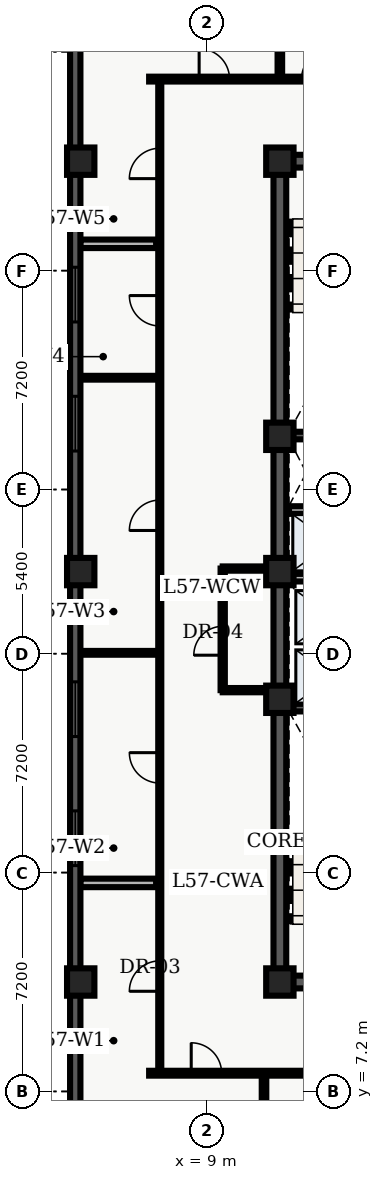
"""IFC4 building model, lengths in metres.
Left out: names, types, materials, properties, quantities, classifications, styles, units other than length and angle.
Written with IfcOpenShell. Run it as: python <this file> out.ifc"""

import sys

from ifc_helpers import new_model, entity, si_unit, converted_unit, direction, frame, origin_with_axes, origin_2d_with_axis, place, context, subcontext, project, spatial, polyline, rectangle, outline, extrude, element, fill, save


model = new_model("IFC4")
c1 = context("Model", 3, precision=1e-05, world=origin_with_axes(), true_north=direction((0.0, 1.0)))
c2 = subcontext(c1, "Body", "Model", "MODEL_VIEW")
j1 = project(units=[si_unit("LENGTHUNIT", "METRE"), converted_unit("PLANEANGLEUNIT", "DEGREE", entity("IfcPlaneAngleMeasure", 0.017), si_unit("PLANEANGLEUNIT", "RADIAN"), dimensions=[0, 0, 0, 0, 0, 0, 0])], contexts=[c1])
p1 = place(None, origin_with_axes())
s1 = spatial("IfcSite", under=j1, at=p1, CompositionType="ELEMENT")
p2 = place(p1, origin_with_axes())
s2 = spatial("IfcBuilding", under=s1, at=p2, CompositionType="ELEMENT")
p3 = place(p2, frame((0.0, 0.0, 232.5), z_axis=(0.0, 0.0, 1.0), x_axis=(1.0, 0.0, 0.0)))
s3 = spatial("IfcBuildingStorey", under=s2, at=p3, CompositionType="ELEMENT", Elevation=232.5)
p4 = place(p3, frame((11.4, 10.8, 0.0), z_axis=(0.0, 0.0, 1.0), x_axis=(0.0, 1.0, 0.0)))
e1 = element("IfcWall", 1, at=p4, inside=s3, PredefinedType="SHEAR", context=c2, shape_type="SweptSolid", body=[
    extrude(outline(polyline([(0.0, -0.21), (27.0, -0.21), (27.0, 0.21), (0.0, 0.21), (0.0, -0.21)])), origin_with_axes(), (0.0, 0.0, 1.0), 3.66),
])
p5 = place(p3, frame((11.4, 10.8, 0.0), z_axis=(0.0, 0.0, 1.0), x_axis=(1.0, 0.0, 0.0)))
e2 = element("IfcWall", 2, at=p5, inside=s3, PredefinedType="SHEAR", context=c2, shape_type="SweptSolid", body=[
    extrude(outline(polyline([(0.0, -0.21), (7.2, -0.21), (7.2, 0.21), (0.0, 0.21), (0.0, -0.21)])), origin_with_axes(), (0.0, 0.0, 1.0), 3.66),
])
p6 = place(p5, frame((2.625, 0.0, 0.0), z_axis=(0.0, 0.0, 1.0), x_axis=(1.0, 0.0, 0.0)))
e3 = element("IfcOpeningElement", 3, at=p6, cuts=e2, PredefinedType="OPENING", context=c2, shape_type="SweptSolid", body=[
    extrude(rectangle(XDim=1.05, YDim=0.44, at=origin_2d_with_axis()), origin_with_axes(), (0.0, 0.0, 1.0), 2.15),
])
p7 = place(p3, frame((11.4, 37.8, 0.0), z_axis=(0.0, 0.0, 1.0), x_axis=(1.0, 0.0, 0.0)))
e4 = element("IfcWall", 4, at=p7, inside=s3, PredefinedType="SHEAR", context=c2, shape_type="SweptSolid", body=[
    extrude(outline(polyline([(0.0, -0.21), (7.2, -0.21), (7.2, 0.21), (0.0, 0.21), (0.0, -0.21)])), origin_with_axes(), (0.0, 0.0, 1.0), 3.66),
])
p8 = place(p7, frame((2.625, 0.0, 0.0), z_axis=(0.0, 0.0, 1.0), x_axis=(1.0, 0.0, 0.0)))
e5 = element("IfcOpeningElement", 5, at=p8, cuts=e4, PredefinedType="OPENING", context=c2, shape_type="SweptSolid", body=[
    extrude(rectangle(XDim=1.05, YDim=0.44, at=origin_2d_with_axis()), origin_with_axes(), (0.0, 0.0, 1.0), 2.15),
])
for number, where, z_axis, x_axis in (
    (6, (11.61, 19.825, 0.0), (0.0, 0.0, 1.0), (1.0, 0.0, 0.0)),
    (7, (11.61, 28.775, 0.0), (0.0, 0.0, 1.0), (1.0, 0.0, 0.0)),
):
    element("IfcWall", number, at=place(p3, frame(where, z_axis=z_axis, x_axis=x_axis)), inside=s3, PredefinedType="SHEAR", context=c2, shape_type="SweptSolid", body=[
        extrude(outline(polyline([(0.0, -0.125), (6.78, -0.125), (6.78, 0.125), (0.0, 0.125), (0.0, -0.125)])), origin_with_axes(), (0.0, 0.0, 1.0), 3.66),
    ])
p9 = place(p3, frame((11.7, 24.1, 0.0), z_axis=(0.0, 0.0, 1.0), x_axis=(1.0, 0.0, 0.0)))
e8 = element("IfcWall", 8, at=p9, inside=s3, PredefinedType="SOLIDWALL", context=c2, shape_type="SweptSolid", body=[
    extrude(outline(polyline([(0.0, -0.125), (6.6, -0.125), (6.6, 0.125), (0.0, 0.125), (0.0, -0.125)])), origin_with_axes(), (0.0, 0.0, 1.0), 2.7),
])
p10 = place(p9, frame((3.75, 0.0, 0.0), z_axis=(0.0, 0.0, 1.0), x_axis=(1.0, 0.0, 0.0)))
e9 = element("IfcOpeningElement", 9, at=p10, cuts=e8, PredefinedType="OPENING", context=c2, shape_type="SweptSolid", body=[
    extrude(rectangle(XDim=0.9, YDim=0.27, at=origin_2d_with_axis()), origin_with_axes(), (0.0, 0.0, 1.0), 2.15),
])
p11 = place(p3, frame((11.7, 26.325, 0.0), z_axis=(0.0, 0.0, 1.0), x_axis=(1.0, 0.0, 0.0)))
e10 = element("IfcWall", 10, at=p11, inside=s3, PredefinedType="SOLIDWALL", context=c2, shape_type="SweptSolid", body=[
    extrude(outline(polyline([(0.0, -0.125), (6.6, -0.125), (6.6, 0.125), (0.0, 0.125), (0.0, -0.125)])), origin_with_axes(), (0.0, 0.0, 1.0), 2.7),
])
p12 = place(p11, frame((3.5, 0.0, 0.0), z_axis=(0.0, 0.0, 1.0), x_axis=(1.0, 0.0, 0.0)))
e11 = element("IfcOpeningElement", 11, at=p12, cuts=e10, PredefinedType="OPENING", context=c2, shape_type="SweptSolid", body=[
    extrude(rectangle(XDim=0.9, YDim=0.27, at=origin_2d_with_axis()), origin_with_axes(), (0.0, 0.0, 1.0), 2.15),
])
for number, where, z_axis, x_axis in (
    (12, (11.4, 10.8, 0.0), (0.0, 0.0, 1.0), (1.0, 0.0, 0.0)),
    (13, (11.4, 20.1, 0.0), (0.0, 0.0, 1.0), (1.0, 0.0, 0.0)),
    (14, (11.4, 24.3, 0.0), (0.0, 0.0, 1.0), (1.0, 0.0, 0.0)),
    (15, (11.4, 28.75, 0.0), (0.0, 0.0, 1.0), (1.0, 0.0, 0.0)),
    (16, (11.4, 37.8, 0.0), (0.0, 0.0, 1.0), (1.0, 0.0, 0.0)),
    (17, (4.85, 10.8, 0.0), (0.0, 0.0, 1.0), (1.0, 0.0, 0.0)),
    (18, (4.85, 24.3, 0.0), (0.0, 0.0, 1.0), (1.0, 0.0, 0.0)),
    (19, (4.85, 37.8, 0.0), (0.0, 0.0, 1.0), (1.0, 0.0, 0.0)),
):
    element("IfcColumn", number, at=place(p3, frame(where, z_axis=z_axis, x_axis=x_axis)), inside=s3, PredefinedType="COLUMN", context=c2, shape_type="SweptSolid", body=[
        extrude(rectangle(XDim=0.9, YDim=0.9, at=origin_2d_with_axis()), origin_with_axes(), (0.0, 0.0, 1.0), 3.9),
    ])
p13 = place(p3, frame((9.52, 20.4, 0.0), z_axis=(0.0, 0.0, 1.0), x_axis=(0.0, 1.0, 0.0)))
e20 = element("IfcWall", 20, at=p13, inside=s3, PredefinedType="PARTITIONING", context=c2, shape_type="SweptSolid", body=[
    extrude(outline(polyline([(0.0, -0.07), (4.0, -0.07), (4.0, 0.07), (0.0, 0.07), (0.0, -0.07)])), origin_with_axes(), (0.0, 0.0, 1.0), 2.7),
])
p14 = place(p13, frame((1.625, 0.0, 0.0), z_axis=(0.0, 0.0, 1.0), x_axis=(1.0, 0.0, 0.0)))
e21 = element("IfcOpeningElement", 21, at=p14, cuts=e20, PredefinedType="OPENING", context=c2, shape_type="SweptSolid", body=[
    extrude(rectangle(XDim=0.95, YDim=0.16, at=origin_2d_with_axis()), origin_with_axes(), (0.0, 0.0, 1.0), 2.15),
])
for number, where, z_axis, x_axis in (
    (22, (9.52, 20.4, 0.0), (0.0, 0.0, 1.0), (1.0, 0.0, 0.0)),
    (23, (9.52, 24.4, 0.0), (0.0, 0.0, 1.0), (1.0, 0.0, 0.0)),
):
    element("IfcWall", number, at=place(p3, frame(where, z_axis=z_axis, x_axis=x_axis)), inside=s3, PredefinedType="PARTITIONING", context=c2, shape_type="SweptSolid", body=[
        extrude(outline(polyline([(0.0, -0.07), (1.58, -0.07), (1.58, 0.07), (0.0, 0.07), (0.0, -0.07)])), origin_with_axes(), (0.0, 0.0, 1.0), 2.7),
    ])
p15 = place(p3, frame((7.1, 7.8, 0.0), z_axis=(0.0, 0.0, 1.0), x_axis=(1.0, 0.0, 0.0)))
e24 = element("IfcWall", 24, at=p15, inside=s3, PredefinedType="PARTITIONING", context=c2, shape_type="SweptSolid", body=[
    extrude(outline(polyline([(0.0, -0.08), (13.2, -0.08), (13.2, 0.08), (0.0, 0.08), (0.0, -0.08)])), origin_with_axes(), (0.0, 0.0, 1.0), 2.7),
])
p16 = place(p15, frame((1.885, 0.0, 0.0), z_axis=(0.0, 0.0, 1.0), x_axis=(1.0, 0.0, 0.0)))
e25 = element("IfcOpeningElement", 25, at=p16, cuts=e24, PredefinedType="OPENING", context=c2, shape_type="SweptSolid", body=[
    extrude(rectangle(XDim=1.0, YDim=0.18, at=origin_2d_with_axis()), origin_with_axes(), (0.0, 0.0, 1.0), 2.15),
])
p17 = place(p15, frame((5.909, 0.0, 0.0), z_axis=(0.0, 0.0, 1.0), x_axis=(1.0, 0.0, 0.0)))
e26 = element("IfcOpeningElement", 26, at=p17, cuts=e24, PredefinedType="OPENING", context=c2, shape_type="SweptSolid", body=[
    extrude(rectangle(XDim=1.0, YDim=0.18, at=origin_2d_with_axis()), origin_with_axes(), (0.0, 0.0, 1.0), 2.15),
])
p18 = place(p15, frame((10.594, 0.0, 0.0), z_axis=(0.0, 0.0, 1.0), x_axis=(1.0, 0.0, 0.0)))
e27 = element("IfcOpeningElement", 27, at=p18, cuts=e24, PredefinedType="OPENING", context=c2, shape_type="SweptSolid", body=[
    extrude(rectangle(XDim=1.0, YDim=0.18, at=origin_2d_with_axis()), origin_with_axes(), (0.0, 0.0, 1.0), 2.15),
])
p19 = place(p3, frame((7.1, 40.5, 0.0), z_axis=(0.0, 0.0, 1.0), x_axis=(1.0, 0.0, 0.0)))
e28 = element("IfcWall", 28, at=p19, inside=s3, PredefinedType="PARTITIONING", context=c2, shape_type="SweptSolid", body=[
    extrude(outline(polyline([(0.0, -0.08), (24.965, -0.08), (24.965, 0.08), (0.0, 0.08), (0.0, -0.08)])), origin_with_axes(), (0.0, 0.0, 1.0), 2.7),
])
p20 = place(p19, frame((2.145, 0.0, 0.0), z_axis=(0.0, 0.0, 1.0), x_axis=(1.0, 0.0, 0.0)))
e29 = element("IfcOpeningElement", 29, at=p20, cuts=e28, PredefinedType="OPENING", context=c2, shape_type="SweptSolid", body=[
    extrude(rectangle(XDim=1.0, YDim=0.18, at=origin_2d_with_axis()), origin_with_axes(), (0.0, 0.0, 1.0), 2.15),
])
p21 = place(p19, frame((5.514, 0.0, 0.0), z_axis=(0.0, 0.0, 1.0), x_axis=(1.0, 0.0, 0.0)))
e30 = element("IfcOpeningElement", 30, at=p21, cuts=e28, PredefinedType="OPENING", context=c2, shape_type="SweptSolid", body=[
    extrude(rectangle(XDim=1.0, YDim=0.18, at=origin_2d_with_axis()), origin_with_axes(), (0.0, 0.0, 1.0), 2.15),
])
p22 = place(p19, frame((8.217, 0.0, 0.0), z_axis=(0.0, 0.0, 1.0), x_axis=(1.0, 0.0, 0.0)))
e31 = element("IfcOpeningElement", 31, at=p22, cuts=e28, PredefinedType="OPENING", context=c2, shape_type="SweptSolid", body=[
    extrude(rectangle(XDim=1.0, YDim=0.18, at=origin_2d_with_axis()), origin_with_axes(), (0.0, 0.0, 1.0), 2.15),
])
p23 = place(p19, frame((11.083, 0.0, 0.0), z_axis=(0.0, 0.0, 1.0), x_axis=(1.0, 0.0, 0.0)))
e32 = element("IfcOpeningElement", 32, at=p23, cuts=e28, PredefinedType="OPENING", context=c2, shape_type="SweptSolid", body=[
    extrude(rectangle(XDim=1.0, YDim=0.18, at=origin_2d_with_axis()), origin_with_axes(), (0.0, 0.0, 1.0), 2.15),
])
p24 = place(p3, frame((7.45, 7.8, 0.0), z_axis=(0.0, 0.0, 1.0), x_axis=(0.0, 1.0, 0.0)))
e33 = element("IfcWall", 33, at=p24, inside=s3, PredefinedType="PARTITIONING", context=c2, shape_type="SweptSolid", body=[
    extrude(outline(polyline([(0.0, -0.05), (32.7, -0.05), (32.7, 0.05), (0.0, 0.05), (0.0, -0.05)])), origin_with_axes(), (0.0, 0.0, 1.0), 2.7),
])
p25 = place(p24, frame((3.195, 0.0, 0.0), z_axis=(0.0, 0.0, 1.0), x_axis=(1.0, 0.0, 0.0)))
e34 = element("IfcOpeningElement", 34, at=p25, cuts=e33, PredefinedType="OPENING", context=c2, shape_type="SweptSolid", body=[
    extrude(rectangle(XDim=1.0, YDim=0.12, at=origin_2d_with_axis()), origin_with_axes(), (0.0, 0.0, 1.0), 2.15),
])
p26 = place(p24, frame((10.044, 0.0, 0.0), z_axis=(0.0, 0.0, 1.0), x_axis=(1.0, 0.0, 0.0)))
e35 = element("IfcOpeningElement", 35, at=p26, cuts=e33, PredefinedType="OPENING", context=c2, shape_type="SweptSolid", body=[
    extrude(rectangle(XDim=1.0, YDim=0.12, at=origin_2d_with_axis()), origin_with_axes(), (0.0, 0.0, 1.0), 2.15),
])
p27 = place(p24, frame((18.352, 0.0, 0.0), z_axis=(0.0, 0.0, 1.0), x_axis=(1.0, 0.0, 0.0)))
e36 = element("IfcOpeningElement", 36, at=p27, cuts=e33, PredefinedType="OPENING", context=c2, shape_type="SweptSolid", body=[
    extrude(rectangle(XDim=1.0, YDim=0.12, at=origin_2d_with_axis()), origin_with_axes(), (0.0, 0.0, 1.0), 2.15),
])
p28 = place(p24, frame((25.079, 0.0, 0.0), z_axis=(0.0, 0.0, 1.0), x_axis=(1.0, 0.0, 0.0)))
e37 = element("IfcOpeningElement", 37, at=p28, cuts=e33, PredefinedType="OPENING", context=c2, shape_type="SweptSolid", body=[
    extrude(rectangle(XDim=1.0, YDim=0.12, at=origin_2d_with_axis()), origin_with_axes(), (0.0, 0.0, 1.0), 2.15),
])
p29 = place(p24, frame((29.926, 0.0, 0.0), z_axis=(0.0, 0.0, 1.0), x_axis=(1.0, 0.0, 0.0)))
e38 = element("IfcOpeningElement", 38, at=p29, cuts=e33, PredefinedType="OPENING", context=c2, shape_type="SweptSolid", body=[
    extrude(rectangle(XDim=1.0, YDim=0.12, at=origin_2d_with_axis()), origin_with_axes(), (0.0, 0.0, 1.0), 2.15),
])
p30 = place(p3, frame((4.835, 14.06, 0.0), z_axis=(0.0, 0.0, 1.0), x_axis=(1.0, 0.0, 0.0)))
e39 = element("IfcWall", 39, at=p30, inside=s3, PredefinedType="PARTITIONING", context=c2, shape_type="SweptSolid", body=[
    extrude(outline(polyline([(0.0, -0.14), (2.495, -0.14), (2.495, 0.14), (0.0, 0.14), (0.0, -0.14)])), origin_with_axes(), (0.0, 0.0, 1.0), 2.7),
])
for number, where, z_axis, x_axis in (
    (40, (4.835, 21.628, 0.0), (0.0, 0.0, 1.0), (1.0, 0.0, 0.0)),
    (41, (4.835, 30.677, 0.0), (0.0, 0.0, 1.0), (1.0, 0.0, 0.0)),
):
    element("IfcWall", number, at=place(p3, frame(where, z_axis=z_axis, x_axis=x_axis)), inside=s3, PredefinedType="PARTITIONING", context=c2, shape_type="SweptSolid", body=[
        extrude(outline(polyline([(0.0, -0.062), (2.495, -0.062), (2.495, 0.062), (0.0, 0.062), (0.0, -0.062)])), origin_with_axes(), (0.0, 0.0, 1.0), 2.7),
    ])
p31 = place(p3, frame((4.835, 35.082, 0.0), z_axis=(0.0, 0.0, 1.0), x_axis=(1.0, 0.0, 0.0)))
e42 = element("IfcWall", 42, at=p31, inside=s3, PredefinedType="PARTITIONING", context=c2, shape_type="SweptSolid", body=[
    extrude(outline(polyline([(0.0, -0.14), (2.495, -0.14), (2.495, 0.14), (0.0, 0.14), (0.0, -0.14)])), origin_with_axes(), (0.0, 0.0, 1.0), 2.7),
])
p32 = place(p3, frame((10.879, 0.335, 0.0), z_axis=(0.0, 0.0, 1.0), x_axis=(0.0, 1.0, 0.0)))
e43 = element("IfcWall", 43, at=p32, inside=s3, PredefinedType="PARTITIONING", context=c2, shape_type="SweptSolid", body=[
    extrude(outline(polyline([(0.0, -0.075), (7.365, -0.075), (7.365, 0.075), (0.0, 0.075), (0.0, -0.075)])), origin_with_axes(), (0.0, 0.0, 1.0), 2.7),
])
p33 = place(p3, frame((11.4, 40.6, 0.0), z_axis=(0.0, 0.0, 1.0), x_axis=(0.0, 1.0, 0.0)))
e44 = element("IfcWall", 44, at=p33, inside=s3, PredefinedType="PARTITIONING", context=c2, shape_type="SweptSolid", body=[
    extrude(outline(polyline([(0.0, -0.075), (7.665, -0.075), (7.665, 0.075), (0.0, 0.075), (0.0, -0.075)])), origin_with_axes(), (0.0, 0.0, 1.0), 2.7),
])
p34 = place(p3, frame((4.67, 2.74, 0.0), z_axis=(0.0, 0.0, 1.0), x_axis=(0.0, 1.0, 0.0)))
e45 = element("IfcWall", 45, at=p34, inside=s3, PredefinedType="SOLIDWALL", context=c2, shape_type="SweptSolid", body=[
    extrude(outline(polyline([(0.0, -0.17), (43.46, -0.17), (43.46, 0.17), (0.0, 0.17), (0.0, -0.17)])), origin_with_axes(), (0.0, 0.0, 1.0), 3.66),
])
p35 = place(p34, frame((2.948, 0.0, 0.45), z_axis=(0.0, 0.0, 1.0), x_axis=(1.0, 0.0, 0.0)))
e46 = element("IfcOpeningElement", 46, at=p35, cuts=e45, PredefinedType="OPENING", context=c2, shape_type="SweptSolid", body=[
    extrude(rectangle(XDim=1.8, YDim=0.36, at=origin_2d_with_axis()), origin_with_axes(), (0.0, 0.0, 1.0), 2.1),
])
p36 = place(p34, frame((12.789, 0.0, 0.45), z_axis=(0.0, 0.0, 1.0), x_axis=(1.0, 0.0, 0.0)))
e47 = element("IfcOpeningElement", 47, at=p36, cuts=e45, PredefinedType="OPENING", context=c2, shape_type="SweptSolid", body=[
    extrude(rectangle(XDim=1.8, YDim=0.36, at=origin_2d_with_axis()), origin_with_axes(), (0.0, 0.0, 1.0), 2.1),
])
p37 = place(p34, frame((17.034, 0.0, 0.45), z_axis=(0.0, 0.0, 1.0), x_axis=(1.0, 0.0, 0.0)))
e48 = element("IfcOpeningElement", 48, at=p37, cuts=e45, PredefinedType="OPENING", context=c2, shape_type="SweptSolid", body=[
    extrude(rectangle(XDim=1.8, YDim=0.36, at=origin_2d_with_axis()), origin_with_axes(), (0.0, 0.0, 1.0), 2.1),
])
p38 = place(p34, frame((26.426, 0.0, 0.45), z_axis=(0.0, 0.0, 1.0), x_axis=(1.0, 0.0, 0.0)))
e49 = element("IfcOpeningElement", 49, at=p38, cuts=e45, PredefinedType="OPENING", context=c2, shape_type="SweptSolid", body=[
    extrude(rectangle(XDim=1.8, YDim=0.36, at=origin_2d_with_axis()), origin_with_axes(), (0.0, 0.0, 1.0), 2.1),
])
p39 = place(p34, frame((30.671, 0.0, 0.45), z_axis=(0.0, 0.0, 1.0), x_axis=(1.0, 0.0, 0.0)))
e50 = element("IfcOpeningElement", 50, at=p39, cuts=e45, PredefinedType="OPENING", context=c2, shape_type="SweptSolid", body=[
    extrude(rectangle(XDim=1.8, YDim=0.36, at=origin_2d_with_axis()), origin_with_axes(), (0.0, 0.0, 1.0), 2.1),
])
p40 = place(p34, frame((40.062, 0.0, 0.45), z_axis=(0.0, 0.0, 1.0), x_axis=(1.0, 0.0, 0.0)))
e51 = element("IfcOpeningElement", 51, at=p40, cuts=e45, PredefinedType="OPENING", context=c2, shape_type="SweptSolid", body=[
    extrude(rectangle(XDim=1.8, YDim=0.36, at=origin_2d_with_axis()), origin_with_axes(), (0.0, 0.0, 1.0), 2.1),
])
p41 = place(p13, frame((1.625, 0.0, 0.0), z_axis=(0.0, 0.0, 1.0), x_axis=(1.0, 0.0, 0.0)))
e52 = element("IfcDoor", 52, at=p41, inside=s3, OperationType="SINGLE_SWING_LEFT", PredefinedType="DOOR", context=c2, shape_type="SweptSolid", body=[
    extrude(rectangle(XDim=0.95, YDim=0.084, at=origin_2d_with_axis()), origin_with_axes(), (0.0, 0.0, 1.0), 2.15),
])
fill(e21, e52)
p42 = place(p24, frame((3.195, 0.0, 0.0), z_axis=(0.0, 0.0, 1.0), x_axis=(1.0, 0.0, 0.0)))
e53 = element("IfcDoor", 53, at=p42, inside=s3, OperationType="SINGLE_SWING_LEFT", PredefinedType="DOOR", context=c2, shape_type="SweptSolid", body=[
    extrude(rectangle(XDim=1.0, YDim=0.06, at=origin_2d_with_axis()), origin_with_axes(), (0.0, 0.0, 1.0), 2.15),
])
fill(e34, e53)
p43 = place(p24, frame((10.044, 0.0, 0.0), z_axis=(0.0, 0.0, 1.0), x_axis=(1.0, 0.0, 0.0)))
e54 = element("IfcDoor", 54, at=p43, inside=s3, OperationType="SINGLE_SWING_RIGHT", PredefinedType="DOOR", context=c2, shape_type="SweptSolid", body=[
    extrude(rectangle(XDim=1.0, YDim=0.06, at=origin_2d_with_axis()), origin_with_axes(), (0.0, 0.0, 1.0), 2.15),
])
fill(e35, e54)
p44 = place(p24, frame((18.352, 0.0, 0.0), z_axis=(0.0, 0.0, 1.0), x_axis=(1.0, 0.0, 0.0)))
e55 = element("IfcDoor", 55, at=p44, inside=s3, OperationType="SINGLE_SWING_LEFT", PredefinedType="DOOR", context=c2, shape_type="SweptSolid", body=[
    extrude(rectangle(XDim=1.0, YDim=0.06, at=origin_2d_with_axis()), origin_with_axes(), (0.0, 0.0, 1.0), 2.15),
])
fill(e36, e55)
p45 = place(p24, frame((25.079, 0.0, 0.0), z_axis=(0.0, 0.0, 1.0), x_axis=(1.0, 0.0, 0.0)))
e56 = element("IfcDoor", 56, at=p45, inside=s3, OperationType="SINGLE_SWING_RIGHT", PredefinedType="DOOR", context=c2, shape_type="SweptSolid", body=[
    extrude(rectangle(XDim=1.0, YDim=0.06, at=origin_2d_with_axis()), origin_with_axes(), (0.0, 0.0, 1.0), 2.15),
])
fill(e37, e56)
p46 = place(p24, frame((29.926, 0.0, 0.0), z_axis=(0.0, 0.0, 1.0), x_axis=(1.0, 0.0, 0.0)))
e57 = element("IfcDoor", 57, at=p46, inside=s3, OperationType="SINGLE_SWING_LEFT", PredefinedType="DOOR", context=c2, shape_type="SweptSolid", body=[
    extrude(rectangle(XDim=1.0, YDim=0.06, at=origin_2d_with_axis()), origin_with_axes(), (0.0, 0.0, 1.0), 2.15),
])
fill(e38, e57)
p47 = place(p15, frame((1.885, 0.0, 0.0), z_axis=(0.0, 0.0, 1.0), x_axis=(1.0, 0.0, 0.0)))
e58 = element("IfcDoor", 58, at=p47, inside=s3, OperationType="SINGLE_SWING_LEFT", PredefinedType="DOOR", context=c2, shape_type="SweptSolid", body=[
    extrude(rectangle(XDim=1.0, YDim=0.09, at=origin_2d_with_axis()), origin_with_axes(), (0.0, 0.0, 1.0), 2.15),
])
fill(e25, e58)
p48 = place(p19, frame((2.145, 0.0, 0.0), z_axis=(0.0, 0.0, 1.0), x_axis=(1.0, 0.0, 0.0)))
e59 = element("IfcDoor", 59, at=p48, inside=s3, OperationType="SINGLE_SWING_LEFT", PredefinedType="DOOR", context=c2, shape_type="SweptSolid", body=[
    extrude(rectangle(XDim=1.0, YDim=0.09, at=origin_2d_with_axis()), origin_with_axes(), (0.0, 0.0, 1.0), 2.15),
])
fill(e29, e59)
p49 = place(p19, frame((5.514, 0.0, 0.0), z_axis=(0.0, 0.0, 1.0), x_axis=(1.0, 0.0, 0.0)))
e60 = element("IfcDoor", 60, at=p49, inside=s3, OperationType="SINGLE_SWING_RIGHT", PredefinedType="DOOR", context=c2, shape_type="SweptSolid", body=[
    extrude(rectangle(XDim=1.0, YDim=0.09, at=origin_2d_with_axis()), origin_with_axes(), (0.0, 0.0, 1.0), 2.15),
])
fill(e30, e60)
p50 = place(p34, frame((12.789, 0.0, 0.45), z_axis=(0.0, 0.0, 1.0), x_axis=(1.0, 0.0, 0.0)))
e61 = element("IfcWindow", 61, at=p50, inside=s3, PredefinedType="WINDOW", context=c2, shape_type="SweptSolid", body=[
    extrude(rectangle(XDim=1.8, YDim=0.09, at=origin_2d_with_axis()), origin_with_axes(), (0.0, 0.0, 1.0), 2.1),
])
fill(e47, e61)
p51 = place(p34, frame((17.034, 0.0, 0.45), z_axis=(0.0, 0.0, 1.0), x_axis=(1.0, 0.0, 0.0)))
e62 = element("IfcWindow", 62, at=p51, inside=s3, PredefinedType="WINDOW", context=c2, shape_type="SweptSolid", body=[
    extrude(rectangle(XDim=1.8, YDim=0.09, at=origin_2d_with_axis()), origin_with_axes(), (0.0, 0.0, 1.0), 2.1),
])
fill(e48, e62)
p52 = place(p34, frame((26.426, 0.0, 0.45), z_axis=(0.0, 0.0, 1.0), x_axis=(1.0, 0.0, 0.0)))
e63 = element("IfcWindow", 63, at=p52, inside=s3, PredefinedType="WINDOW", context=c2, shape_type="SweptSolid", body=[
    extrude(rectangle(XDim=1.8, YDim=0.09, at=origin_2d_with_axis()), origin_with_axes(), (0.0, 0.0, 1.0), 2.1),
])
fill(e49, e63)
p53 = place(p34, frame((30.671, 0.0, 0.45), z_axis=(0.0, 0.0, 1.0), x_axis=(1.0, 0.0, 0.0)))
e64 = element("IfcWindow", 64, at=p53, inside=s3, PredefinedType="WINDOW", context=c2, shape_type="SweptSolid", body=[
    extrude(rectangle(XDim=1.8, YDim=0.09, at=origin_2d_with_axis()), origin_with_axes(), (0.0, 0.0, 1.0), 2.1),
])
fill(e50, e64)
save(model, sys.argv[1])
